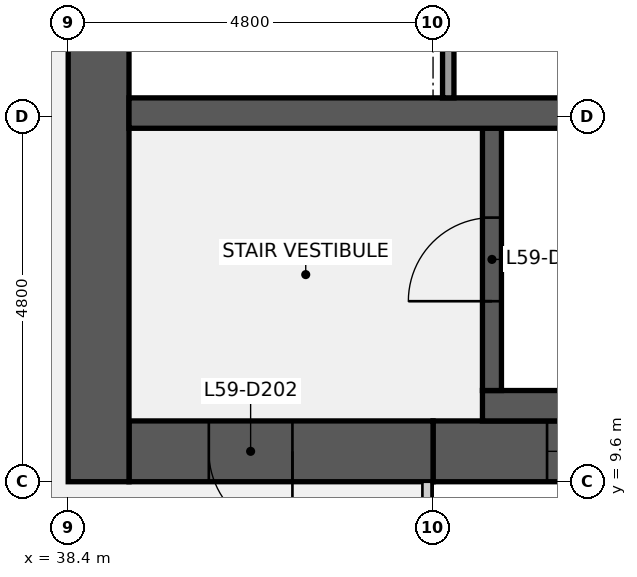
"""IFC4 building model, lengths in metres.
Left out: names, types, materials, properties, quantities, classifications, styles, units other than length and angle.
Written with IfcOpenShell. Run it as: python <this file> out.ifc"""

import sys

from ifc_helpers import new_model, si_unit, direction, frame, frame_2d, origin, place, context, subcontext, project, spatial, rectangle, extrude, element, fill, save


model = new_model("IFC4")
c1 = context("Model", 3, precision=1e-05, world=origin(), true_north=direction((0.0, 1.0)))
c2 = subcontext(c1, "Body", "Model", "MODEL_VIEW")
j1 = project(units=[si_unit("LENGTHUNIT", "METRE"), si_unit("PLANEANGLEUNIT", "RADIAN")], contexts=[c1])
p1 = place(None, origin())
s1 = spatial("IfcSite", under=j1, at=p1, CompositionType="ELEMENT")
p2 = place(p1, origin())
s2 = spatial("IfcBuilding", under=s1, at=p2, CompositionType="ELEMENT")
p3 = place(p2, frame((0.0, 0.0, 265.2)))
s3 = spatial("IfcBuildingStorey", under=s2, at=p3, CompositionType="ELEMENT", Elevation=265.2)
p4 = place(p3, frame((56.8, 10.0, 0.0), z_axis=(0.0, 0.0, 1.0), x_axis=(-1.0, 0.0, 0.0)))
e1 = element("IfcWall", 1, at=p4, inside=s3, PredefinedType="SHEAR", context=c2, shape_type="SweptSolid", body=[
    extrude(rectangle(XDim=13.6, YDim=0.8, at=frame_2d((6.8, 0.0))), origin(), (0.0, 0.0, 1.0), 4.1),
])
p5 = place(p4, frame((5.5, 0.0, 0.9)))
e2 = element("IfcOpeningElement", 2, at=p5, cuts=e1, PredefinedType="OPENING", context=c2, shape_type="SweptSolid", body=[
    extrude(rectangle(XDim=1.8, YDim=1.5, at=frame_2d((0.9, 0.75))), frame((0.0, 0.41, 0.0), z_axis=(0.0, -1.0, 0.0), x_axis=(1.0, 0.0, 0.0)), (0.0, 0.0, 1.0), 0.82),
])
p6 = place(p4, frame((10.3, 0.0, 0.9)))
e3 = element("IfcOpeningElement", 3, at=p6, cuts=e1, PredefinedType="OPENING", context=c2, shape_type="SweptSolid", body=[
    extrude(rectangle(XDim=1.8, YDim=1.5, at=frame_2d((0.9, 0.75))), frame((0.0, 0.41, 0.0), z_axis=(0.0, -1.0, 0.0), x_axis=(1.0, 0.0, 0.0)), (0.0, 0.0, 1.0), 0.82),
])
p7 = place(p3, frame((43.2, 10.0, 0.0), z_axis=(0.0, 0.0, 1.0), x_axis=(-1.0, 0.0, 0.0)))
e4 = element("IfcWall", 4, at=p7, inside=s3, PredefinedType="SHEAR", context=c2, shape_type="SweptSolid", body=[
    extrude(rectangle(XDim=4.0, YDim=0.8, at=frame_2d((2.0, 0.0))), origin(), (0.0, 0.0, 1.0), 4.1),
])
p8 = place(p7, frame((1.85, 0.0, 0.0)))
e5 = element("IfcOpeningElement", 5, at=p8, cuts=e4, PredefinedType="OPENING", context=c2, shape_type="SweptSolid", body=[
    extrude(rectangle(XDim=1.1, YDim=2.1, at=frame_2d((0.55, 1.05))), frame((0.0, 0.41, 0.0), z_axis=(0.0, -1.0, 0.0), x_axis=(1.0, 0.0, 0.0)), (0.0, 0.0, 1.0), 0.82),
])
p9 = place(p3, frame((38.8, 9.6, 0.0), z_axis=(0.0, 0.0, 1.0), x_axis=(0.0, 1.0, 0.0)))
e6 = element("IfcWall", 6, at=p9, inside=s3, PredefinedType="SHEAR", context=c2, shape_type="SweptSolid", body=[
    extrude(rectangle(XDim=28.8, YDim=0.8, at=frame_2d((14.4, 0.0))), origin(), (0.0, 0.0, 1.0), 4.1),
])
p10 = place(p9, frame((8.7, 0.0, 0.0)))
e7 = element("IfcOpeningElement", 7, at=p10, cuts=e6, PredefinedType="OPENING", context=c2, shape_type="SweptSolid", body=[
    extrude(rectangle(XDim=1.8, YDim=2.1, at=frame_2d((0.9, 1.05))), frame((0.0, 0.41, 0.0), z_axis=(0.0, -1.0, 0.0), x_axis=(1.0, 0.0, 0.0)), (0.0, 0.0, 1.0), 0.82),
])
p11 = place(p9, frame((18.3, 0.0, 0.0)))
e8 = element("IfcOpeningElement", 8, at=p11, cuts=e6, PredefinedType="OPENING", context=c2, shape_type="SweptSolid", body=[
    extrude(rectangle(XDim=1.8, YDim=2.1, at=frame_2d((0.9, 1.05))), frame((0.0, 0.41, 0.0), z_axis=(0.0, -1.0, 0.0), x_axis=(1.0, 0.0, 0.0)), (0.0, 0.0, 1.0), 0.82),
])
p12 = place(p3, frame((43.85, 10.6, 0.0), z_axis=(0.0, 0.0, 1.0), x_axis=(1.0, 0.0, 0.0)))
e9 = element("IfcWall", 9, at=p12, inside=s3, PredefinedType="SHEAR", context=c2, shape_type="SweptSolid", body=[
    extrude(rectangle(XDim=7.5, YDim=0.4, at=frame_2d((3.75, 0.0))), origin(), (0.0, 0.0, 1.0), 4.1),
])
p13 = place(p3, frame((43.975, 10.8, 0.0), z_axis=(0.0, 0.0, 1.0), x_axis=(0.0, 1.0, 0.0)))
e10 = element("IfcWall", 10, at=p13, inside=s3, PredefinedType="SHEAR", context=c2, shape_type="SweptSolid", body=[
    extrude(rectangle(XDim=3.45, YDim=0.25, at=frame_2d((1.725, 0.0))), origin(), (0.0, 0.0, 1.0), 4.1),
])
p14 = place(p13, frame((1.175, 0.0, 0.0)))
e11 = element("IfcOpeningElement", 11, at=p14, cuts=e10, PredefinedType="OPENING", context=c2, shape_type="SweptSolid", body=[
    extrude(rectangle(XDim=1.1, YDim=2.1, at=frame_2d((0.55, 1.05))), frame((0.0, 0.135, 0.0), z_axis=(0.0, -1.0, 0.0), x_axis=(1.0, 0.0, 0.0)), (0.0, 0.0, 1.0), 0.27),
])
p15 = place(p3, frame((39.2, 14.45, 0.0), z_axis=(0.0, 0.0, 1.0), x_axis=(1.0, 0.0, 0.0)))
e12 = element("IfcWall", 12, at=p15, inside=s3, PredefinedType="SHEAR", context=c2, shape_type="SweptSolid", body=[
    extrude(rectangle(XDim=17.6, YDim=0.4, at=frame_2d((8.8, 0.0))), origin(), (0.0, 0.0, 1.0), 4.1),
])
p16 = place(p3, frame((43.4, 14.65, 0.0), z_axis=(0.0, 0.0, 1.0), x_axis=(0.0, 1.0, 0.0)))
e13 = element("IfcWall", 13, at=p16, inside=s3, PredefinedType="PARTITIONING", context=c2, shape_type="SweptSolid", body=[
    extrude(rectangle(XDim=2.6, YDim=0.15, at=frame_2d((1.3, 0.0))), origin(), (0.0, 0.0, 1.0), 4.1),
])
p17 = place(p14, origin())
e14 = element("IfcDoor", 14, at=p17, inside=s3, OperationType="SINGLE_SWING_LEFT", PredefinedType="DOOR", context=c2, shape_type="SweptSolid", body=[
    extrude(rectangle(XDim=1.1, YDim=2.1, at=frame_2d((0.55, 1.05))), frame((0.0, 0.025, 0.0), z_axis=(0.0, -1.0, 0.0), x_axis=(1.0, 0.0, 0.0)), (0.0, 0.0, 1.0), 0.05),
])
fill(e11, e14)
p18 = place(p8, origin())
e15 = element("IfcDoor", 15, at=p18, inside=s3, OperationType="SINGLE_SWING_LEFT", PredefinedType="DOOR", context=c2, shape_type="SweptSolid", body=[
    extrude(rectangle(XDim=1.1, YDim=2.1, at=frame_2d((0.55, 1.05))), frame((0.0, 0.025, 0.0), z_axis=(0.0, -1.0, 0.0), x_axis=(1.0, 0.0, 0.0)), (0.0, 0.0, 1.0), 0.05),
])
fill(e5, e15)
p19 = place(p6, origin())
e16 = element("IfcWindow", 16, at=p19, inside=s3, PartitioningType="SINGLE_PANEL", PredefinedType="WINDOW", context=c2, shape_type="SweptSolid", body=[
    extrude(rectangle(XDim=1.8, YDim=1.5, at=frame_2d((0.9, 0.75))), frame((0.0, 0.03, 0.0), z_axis=(0.0, -1.0, 0.0), x_axis=(1.0, 0.0, 0.0)), (0.0, 0.0, 1.0), 0.06),
])
fill(e3, e16)
save(model, sys.argv[1])
